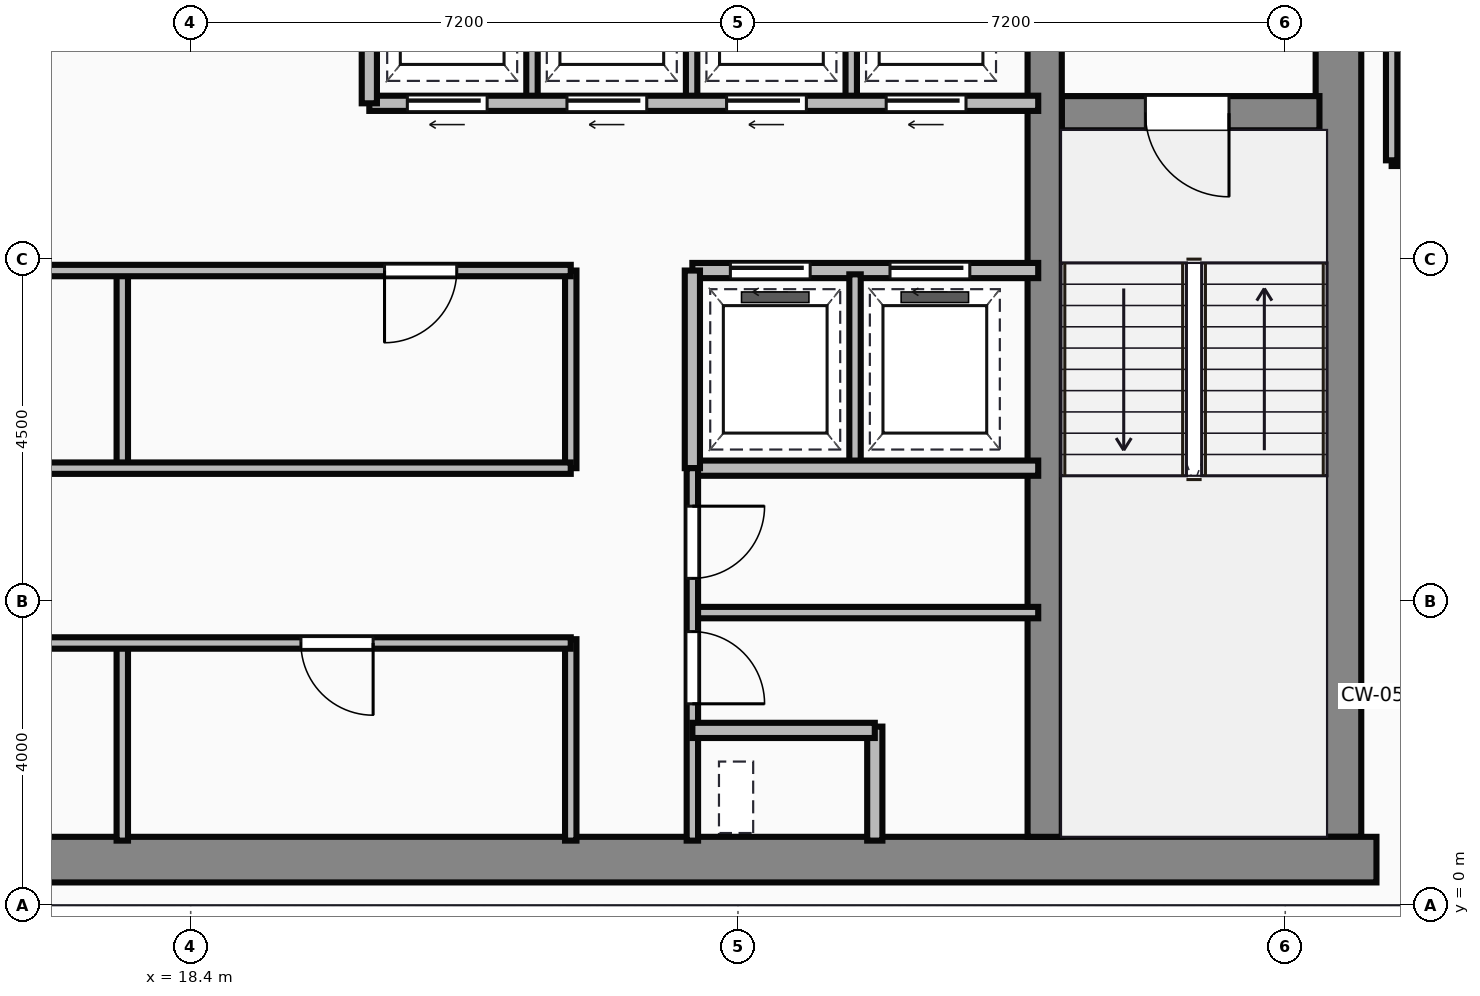
"""IFC4 building model, lengths in metres.
Left out: names, types, materials, properties, quantities, classifications, styles, units other than length and angle.
Written with IfcOpenShell. Run it as: python <this file> out.ifc"""

import sys

from ifc_helpers import new_model, si_unit, direction, frame, frame_2d, origin, place, context, subcontext, project, spatial, rectangle, extrude, source, transform, mapped, element, fill, save


model = new_model("IFC4")
c1 = context("Model", 3, precision=1e-05, world=origin(), true_north=direction((0.0, 1.0)))
c2 = subcontext(c1, "Body", "Model", "MODEL_VIEW")
j1 = project(units=[si_unit("LENGTHUNIT", "METRE"), si_unit("PLANEANGLEUNIT", "RADIAN")], contexts=[c1])
p1 = place(None, origin())
s1 = spatial("IfcSite", under=j1, at=p1, CompositionType="ELEMENT")
p2 = place(p1, origin())
s2 = spatial("IfcBuilding", under=s1, at=p2, CompositionType="ELEMENT")
p3 = place(p2, frame((0.0, 0.0, 217.8)))
s3 = spatial("IfcBuildingStorey", under=s2, at=p3, CompositionType="ELEMENT", Elevation=217.8)
m1 = source(origin(), c2, "Body", "SweptSolid", [
    extrude(rectangle(XDim=29.5, YDim=0.6, at=frame_2d((14.75, 0.0))), origin(), (0.0, 0.0, 1.0), 3.65),
])
p4 = place(p3, frame((4.5, 0.6, 0.0), z_axis=(0.0, 0.0, 1.0), x_axis=(1.0, 0.0, 0.0)))
e1 = element("IfcWall", 1, at=p4, inside=s3, PredefinedType="SHEAR", context=c2, shape_type="MappedRepresentation", body=[
    mapped(m1, transform((0.0, 0.0, 0.0))),
])
m2 = source(origin(), c2, "Body", "SweptSolid", [
    extrude(rectangle(XDim=13.1, YDim=0.6, at=frame_2d((6.55, 0.0))), origin(), (0.0, 0.0, 1.0), 3.65),
])
p5 = place(p3, frame((33.5, 0.9, 0.0), z_axis=(0.0, 0.0, 1.0), x_axis=(0.0, 1.0, 0.0)))
e2 = element("IfcWall", 2, at=p5, inside=s3, PredefinedType="SHEAR", context=c2, shape_type="MappedRepresentation", body=[
    mapped(m2, transform((0.0, 0.0, 0.0))),
])
m3 = source(origin(), c2, "Body", "SweptSolid", [
    extrude(rectangle(XDim=12.5, YDim=0.45, at=frame_2d((6.25, 0.0))), origin(), (0.0, 0.0, 1.0), 3.65),
])
p6 = place(p3, frame((29.635, 0.9, 0.0), z_axis=(0.0, 0.0, 1.0), x_axis=(0.0, 1.0, 0.0)))
e3 = element("IfcWall", 3, at=p6, inside=s3, PredefinedType="SHEAR", context=c2, shape_type="MappedRepresentation", body=[
    mapped(m3, transform((0.0, 0.0, 0.0))),
])
m4 = source(origin(), c2, "Body", "SweptSolid", [
    extrude(rectangle(XDim=3.39, YDim=0.45, at=frame_2d((1.695, 0.0))), origin(), (0.0, 0.0, 1.0), 3.65),
])
p7 = place(p3, frame((29.86, 10.42, 0.0), z_axis=(0.0, 0.0, 1.0), x_axis=(1.0, 0.0, 0.0)))
e4 = element("IfcWall", 4, at=p7, inside=s3, PredefinedType="SHEAR", context=c2, shape_type="MappedRepresentation", body=[
    mapped(m4, transform((0.0, 0.0, 0.0))),
])
p8 = place(p7, frame((1.1, 0.0, 0.0)))
e5 = element("IfcOpeningElement", 5, at=p8, cuts=e4, PredefinedType="OPENING", context=c2, shape_type="SweptSolid", body=[
    extrude(rectangle(XDim=1.1, YDim=2.15, at=frame_2d((0.55, 1.075))), frame((0.0, 0.235, 0.0), z_axis=(0.0, -1.0, 0.0), x_axis=(1.0, 0.0, 0.0)), (0.0, 0.0, 1.0), 0.47),
])
m5 = source(origin(), c2, "Body", "SweptSolid", [
    extrude(rectangle(XDim=10.35, YDim=0.15, at=frame_2d((5.175, 0.0))), origin(), (0.0, 0.0, 1.0), 3.4),
])
p9 = place(p3, frame((13.05, 3.45, 0.0), z_axis=(0.0, 0.0, 1.0), x_axis=(1.0, 0.0, 0.0)))
e6 = element("IfcWall", 6, at=p9, inside=s3, PredefinedType="PARTITIONING", context=c2, shape_type="MappedRepresentation", body=[
    mapped(m5, transform((0.0, 0.0, 0.0))),
])
p10 = place(p9, frame((2.1, 0.0, 0.0)))
e7 = element("IfcOpeningElement", 7, at=p10, cuts=e6, PredefinedType="OPENING", context=c2, shape_type="SweptSolid", body=[
    extrude(rectangle(XDim=0.95, YDim=2.15, at=frame_2d((0.475, 1.075))), frame((0.0, 0.085, 0.0), z_axis=(0.0, -1.0, 0.0), x_axis=(1.0, 0.0, 0.0)), (0.0, 0.0, 1.0), 0.17),
])
p11 = place(p9, frame((6.8, 0.0, 0.0)))
e8 = element("IfcOpeningElement", 8, at=p11, cuts=e6, PredefinedType="OPENING", context=c2, shape_type="SweptSolid", body=[
    extrude(rectangle(XDim=0.95, YDim=2.15, at=frame_2d((0.475, 1.075))), frame((0.0, 0.085, 0.0), z_axis=(0.0, -1.0, 0.0), x_axis=(1.0, 0.0, 0.0)), (0.0, 0.0, 1.0), 0.17),
])
m6 = source(origin(), c2, "Body", "SweptSolid", [
    extrude(rectangle(XDim=2.65, YDim=0.15, at=frame_2d((1.325, 0.0))), origin(), (0.0, 0.0, 1.0), 3.4),
])
p12 = place(p3, frame((23.4, 0.85, 0.0), z_axis=(0.0, 0.0, 1.0), x_axis=(0.0, 1.0, 0.0)))
e9 = element("IfcWall", 9, at=p12, inside=s3, PredefinedType="PARTITIONING", context=c2, shape_type="MappedRepresentation", body=[
    mapped(m6, transform((0.0, 0.0, 0.0))),
])
m7 = source(origin(), c2, "Body", "SweptSolid", [
    extrude(rectangle(XDim=2.6, YDim=0.15, at=frame_2d((1.3, 0.0))), origin(), (0.0, 0.0, 1.0), 3.4),
])
p13 = place(p3, frame((17.5, 0.85, 0.0), z_axis=(0.0, 0.0, 1.0), x_axis=(0.0, 1.0, 0.0)))
e10 = element("IfcWall", 10, at=p13, inside=s3, PredefinedType="PARTITIONING", context=c2, shape_type="MappedRepresentation", body=[
    mapped(m7, transform((0.0, 0.0, 0.0))),
])
m8 = source(origin(), c2, "Body", "SweptSolid", [
    extrude(rectangle(XDim=11.85, YDim=0.15, at=frame_2d((5.925, 0.0))), origin(), (0.0, 0.0, 1.0), 3.4),
])
p14 = place(p3, frame((11.55, 5.75, 0.0), z_axis=(0.0, 0.0, 1.0), x_axis=(1.0, 0.0, 0.0)))
e11 = element("IfcWall", 11, at=p14, inside=s3, PredefinedType="PARTITIONING", context=c2, shape_type="MappedRepresentation", body=[
    mapped(m8, transform((0.0, 0.0, 0.0))),
])
p15 = place(p3, frame((11.55, 8.35, 0.0), z_axis=(0.0, 0.0, 1.0), x_axis=(1.0, 0.0, 0.0)))
e12 = element("IfcWall", 12, at=p15, inside=s3, PredefinedType="PARTITIONING", context=c2, shape_type="MappedRepresentation", body=[
    mapped(m8, transform((0.0, 0.0, 0.0))),
])
p16 = place(p15, frame((1.1, 0.0, 0.0)))
e13 = element("IfcOpeningElement", 13, at=p16, cuts=e12, PredefinedType="OPENING", context=c2, shape_type="SweptSolid", body=[
    extrude(rectangle(XDim=0.95, YDim=2.15, at=frame_2d((0.475, 1.075))), frame((0.0, 0.085, 0.0), z_axis=(0.0, -1.0, 0.0), x_axis=(1.0, 0.0, 0.0)), (0.0, 0.0, 1.0), 0.17),
])
p17 = place(p15, frame((9.4, 0.0, 0.0)))
e14 = element("IfcOpeningElement", 14, at=p17, cuts=e12, PredefinedType="OPENING", context=c2, shape_type="SweptSolid", body=[
    extrude(rectangle(XDim=0.95, YDim=2.15, at=frame_2d((0.475, 1.075))), frame((0.0, 0.085, 0.0), z_axis=(0.0, -1.0, 0.0), x_axis=(1.0, 0.0, 0.0)), (0.0, 0.0, 1.0), 0.17),
])
m9 = source(origin(), c2, "Body", "SweptSolid", [
    extrude(rectangle(XDim=2.6, YDim=0.15, at=frame_2d((1.3, 0.0))), origin(), (0.0, 0.0, 1.0), 3.4),
])
p18 = place(p3, frame((23.4, 5.75, 0.0), z_axis=(0.0, 0.0, 1.0), x_axis=(0.0, 1.0, 0.0)))
e15 = element("IfcWall", 15, at=p18, inside=s3, PredefinedType="PARTITIONING", context=c2, shape_type="MappedRepresentation", body=[
    mapped(m9, transform((0.0, 0.0, 0.0))),
])
m10 = source(origin(), c2, "Body", "SweptSolid", [
    extrude(rectangle(XDim=2.5, YDim=0.15, at=frame_2d((1.25, 0.0))), origin(), (0.0, 0.0, 1.0), 3.4),
])
p19 = place(p3, frame((17.5, 5.8, 0.0), z_axis=(0.0, 0.0, 1.0), x_axis=(0.0, 1.0, 0.0)))
e16 = element("IfcWall", 16, at=p19, inside=s3, PredefinedType="PARTITIONING", context=c2, shape_type="MappedRepresentation", body=[
    mapped(m10, transform((0.0, 0.0, 0.0))),
])
m11 = source(origin(), c2, "Body", "SweptSolid", [
    extrude(rectangle(XDim=8.8, YDim=0.2, at=frame_2d((4.4, 0.0))), origin(), (0.0, 0.0, 1.0), 3.4),
])
p20 = place(p3, frame((20.75, 10.55, 0.0), z_axis=(0.0, 0.0, 1.0), x_axis=(1.0, 0.0, 0.0)))
e17 = element("IfcWall", 17, at=p20, inside=s3, PredefinedType="PARTITIONING", context=c2, shape_type="MappedRepresentation", body=[
    mapped(m11, transform((0.0, 0.0, 0.0))),
])
p21 = place(p20, frame((0.5, 0.0, 0.0)))
e18 = element("IfcOpeningElement", 18, at=p21, cuts=e17, PredefinedType="OPENING", context=c2, shape_type="SweptSolid", body=[
    extrude(rectangle(XDim=1.05, YDim=2.15, at=frame_2d((0.525, 1.075))), frame((0.0, 0.11, 0.0), z_axis=(0.0, -1.0, 0.0), x_axis=(1.0, 0.0, 0.0)), (0.0, 0.0, 1.0), 0.22),
])
p22 = place(p20, frame((2.6, 0.0, 0.0)))
e19 = element("IfcOpeningElement", 19, at=p22, cuts=e17, PredefinedType="OPENING", context=c2, shape_type="SweptSolid", body=[
    extrude(rectangle(XDim=1.05, YDim=2.15, at=frame_2d((0.525, 1.075))), frame((0.0, 0.11, 0.0), z_axis=(0.0, -1.0, 0.0), x_axis=(1.0, 0.0, 0.0)), (0.0, 0.0, 1.0), 0.22),
])
p23 = place(p20, frame((4.7, 0.0, 0.0)))
e20 = element("IfcOpeningElement", 20, at=p23, cuts=e17, PredefinedType="OPENING", context=c2, shape_type="SweptSolid", body=[
    extrude(rectangle(XDim=1.05, YDim=2.15, at=frame_2d((0.525, 1.075))), frame((0.0, 0.11, 0.0), z_axis=(0.0, -1.0, 0.0), x_axis=(1.0, 0.0, 0.0)), (0.0, 0.0, 1.0), 0.22),
])
p24 = place(p20, frame((6.8, 0.0, 0.0)))
e21 = element("IfcOpeningElement", 21, at=p24, cuts=e17, PredefinedType="OPENING", context=c2, shape_type="SweptSolid", body=[
    extrude(rectangle(XDim=1.05, YDim=2.15, at=frame_2d((0.525, 1.075))), frame((0.0, 0.11, 0.0), z_axis=(0.0, -1.0, 0.0), x_axis=(1.0, 0.0, 0.0)), (0.0, 0.0, 1.0), 0.22),
])
m12 = source(origin(), c2, "Body", "SweptSolid", [
    extrude(rectangle(XDim=3.0, YDim=0.2, at=frame_2d((1.5, 0.0))), origin(), (0.0, 0.0, 1.0), 3.4),
])
p25 = place(p3, frame((20.75, 10.55, 0.0), z_axis=(0.0, 0.0, 1.0), x_axis=(0.0, 1.0, 0.0)))
e22 = element("IfcWall", 22, at=p25, inside=s3, PredefinedType="PARTITIONING", context=c2, shape_type="MappedRepresentation", body=[
    mapped(m12, transform((0.0, 0.0, 0.0))),
])
m13 = source(origin(), c2, "Body", "SweptSolid", [
    extrude(rectangle(XDim=2.85, YDim=0.15, at=frame_2d((1.425, 0.0))), origin(), (0.0, 0.0, 1.0), 3.4),
])
for number, where, z_axis, x_axis in (
    (23, (22.89, 10.6, 0.0), (0.0, 0.0, 1.0), (0.0, 1.0, 0.0)),
    (24, (24.99, 10.6, 0.0), (0.0, 0.0, 1.0), (0.0, 1.0, 0.0)),
    (25, (27.09, 10.6, 0.0), (0.0, 0.0, 1.0), (0.0, 1.0, 0.0)),
):
    element("IfcWall", number, at=place(p3, frame(where, z_axis=z_axis, x_axis=x_axis)), inside=s3, PredefinedType="PARTITIONING", context=c2, shape_type="MappedRepresentation", body=[
        mapped(m13, transform((0.0, 0.0, 0.0))),
    ])
m14 = source(origin(), c2, "Body", "SweptSolid", [
    extrude(rectangle(XDim=4.55, YDim=0.2, at=frame_2d((2.275, 0.0))), origin(), (0.0, 0.0, 1.0), 3.4),
])
p26 = place(p3, frame((25.0, 8.35, 0.0), z_axis=(0.0, 0.0, 1.0), x_axis=(1.0, 0.0, 0.0)))
e26 = element("IfcWall", 26, at=p26, inside=s3, PredefinedType="PARTITIONING", context=c2, shape_type="MappedRepresentation", body=[
    mapped(m14, transform((0.0, 0.0, 0.0))),
])
p27 = place(p26, frame((0.5, 0.0, 0.0)))
e27 = element("IfcOpeningElement", 27, at=p27, cuts=e26, PredefinedType="OPENING", context=c2, shape_type="SweptSolid", body=[
    extrude(rectangle(XDim=1.05, YDim=2.15, at=frame_2d((0.525, 1.075))), frame((0.0, 0.11, 0.0), z_axis=(0.0, -1.0, 0.0), x_axis=(1.0, 0.0, 0.0)), (0.0, 0.0, 1.0), 0.22),
])
p28 = place(p26, frame((2.6, 0.0, 0.0)))
e28 = element("IfcOpeningElement", 28, at=p28, cuts=e26, PredefinedType="OPENING", context=c2, shape_type="SweptSolid", body=[
    extrude(rectangle(XDim=1.05, YDim=2.15, at=frame_2d((0.525, 1.075))), frame((0.0, 0.11, 0.0), z_axis=(0.0, -1.0, 0.0), x_axis=(1.0, 0.0, 0.0)), (0.0, 0.0, 1.0), 0.22),
])
p29 = place(p3, frame((25.0, 5.75, 0.0), z_axis=(0.0, 0.0, 1.0), x_axis=(1.0, 0.0, 0.0)))
e29 = element("IfcWall", 29, at=p29, inside=s3, PredefinedType="PARTITIONING", context=c2, shape_type="MappedRepresentation", body=[
    mapped(m14, transform((0.0, 0.0, 0.0))),
])
m15 = source(origin(), c2, "Body", "SweptSolid", [
    extrude(rectangle(XDim=2.6, YDim=0.2, at=frame_2d((1.3, 0.0))), origin(), (0.0, 0.0, 1.0), 3.4),
])
p30 = place(p3, frame((25.0, 5.75, 0.0), z_axis=(0.0, 0.0, 1.0), x_axis=(0.0, 1.0, 0.0)))
e30 = element("IfcWall", 30, at=p30, inside=s3, PredefinedType="PARTITIONING", context=c2, shape_type="MappedRepresentation", body=[
    mapped(m15, transform((0.0, 0.0, 0.0))),
])
p31 = place(p3, frame((27.14, 5.8, 0.0), z_axis=(0.0, 0.0, 1.0), x_axis=(0.0, 1.0, 0.0)))
e31 = element("IfcWall", 31, at=p31, inside=s3, PredefinedType="PARTITIONING", context=c2, shape_type="MappedRepresentation", body=[
    mapped(m10, transform((0.0, 0.0, 0.0))),
])
m16 = source(origin(), c2, "Body", "SweptSolid", [
    extrude(rectangle(XDim=4.9, YDim=0.15, at=frame_2d((2.45, 0.0))), origin(), (0.0, 0.0, 1.0), 3.4),
])
p32 = place(p3, frame((25.0, 0.85, 0.0), z_axis=(0.0, 0.0, 1.0), x_axis=(0.0, 1.0, 0.0)))
e32 = element("IfcWall", 32, at=p32, inside=s3, PredefinedType="PARTITIONING", context=c2, shape_type="MappedRepresentation", body=[
    mapped(m16, transform((0.0, 0.0, 0.0))),
])
p33 = place(p32, frame((1.8, 0.0, 0.0)))
e33 = element("IfcOpeningElement", 33, at=p33, cuts=e32, PredefinedType="OPENING", context=c2, shape_type="SweptSolid", body=[
    extrude(rectangle(XDim=0.95, YDim=2.15, at=frame_2d((0.475, 1.075))), frame((0.0, 0.085, 0.0), z_axis=(0.0, -1.0, 0.0), x_axis=(1.0, 0.0, 0.0)), (0.0, 0.0, 1.0), 0.17),
])
p34 = place(p32, frame((3.45, 0.0, 0.0)))
e34 = element("IfcOpeningElement", 34, at=p34, cuts=e32, PredefinedType="OPENING", context=c2, shape_type="SweptSolid", body=[
    extrude(rectangle(XDim=0.95, YDim=2.15, at=frame_2d((0.475, 1.075))), frame((0.0, 0.085, 0.0), z_axis=(0.0, -1.0, 0.0), x_axis=(1.0, 0.0, 0.0)), (0.0, 0.0, 1.0), 0.17),
])
m17 = source(origin(), c2, "Body", "SweptSolid", [
    extrude(rectangle(XDim=2.4, YDim=0.2, at=frame_2d((1.2, 0.0))), origin(), (0.0, 0.0, 1.0), 3.4),
])
p35 = place(p3, frame((25.0, 2.3, 0.0), z_axis=(0.0, 0.0, 1.0), x_axis=(1.0, 0.0, 0.0)))
e35 = element("IfcWall", 35, at=p35, inside=s3, PredefinedType="PARTITIONING", context=c2, shape_type="MappedRepresentation", body=[
    mapped(m17, transform((0.0, 0.0, 0.0))),
])
m18 = source(origin(), c2, "Body", "SweptSolid", [
    extrude(rectangle(XDim=1.5, YDim=0.2, at=frame_2d((0.75, 0.0))), origin(), (0.0, 0.0, 1.0), 3.4),
])
p36 = place(p3, frame((27.4, 0.85, 0.0), z_axis=(0.0, 0.0, 1.0), x_axis=(0.0, 1.0, 0.0)))
e36 = element("IfcWall", 36, at=p36, inside=s3, PredefinedType="PARTITIONING", context=c2, shape_type="MappedRepresentation", body=[
    mapped(m18, transform((0.0, 0.0, 0.0))),
])
m19 = source(origin(), c2, "Body", "SweptSolid", [
    extrude(rectangle(XDim=4.55, YDim=0.15, at=frame_2d((2.275, 0.0))), origin(), (0.0, 0.0, 1.0), 3.4),
])
p37 = place(p3, frame((25.0, 3.85, 0.0), z_axis=(0.0, 0.0, 1.0), x_axis=(1.0, 0.0, 0.0)))
e37 = element("IfcWall", 37, at=p37, inside=s3, PredefinedType="PARTITIONING", context=c2, shape_type="MappedRepresentation", body=[
    mapped(m19, transform((0.0, 0.0, 0.0))),
])
m20 = source(origin(), c2, "Body", "SweptSolid", [
    extrude(rectangle(XDim=4.8, YDim=0.15, at=frame_2d((2.4, 0.0))), origin(), (0.0, 0.0, 1.0), 3.4),
])
p38 = place(p3, frame((34.2, 9.8, 0.0), z_axis=(0.0, 0.0, 1.0), x_axis=(1.0, 0.0, 0.0)))
e38 = element("IfcWall", 38, at=p38, inside=s3, PredefinedType="PARTITIONING", context=c2, shape_type="MappedRepresentation", body=[
    mapped(m20, transform((0.0, 0.0, 0.0))),
])
m21 = source(origin(), c2, "Body", "SweptSolid", [
    extrude(rectangle(XDim=4.18, YDim=0.15, at=frame_2d((2.09, 0.0))), origin(), (0.0, 0.0, 1.0), 3.4),
])
p39 = place(p3, frame((34.2, 9.8, 0.0), z_axis=(0.0, 0.0, 1.0), x_axis=(0.0, 1.0, 0.0)))
e39 = element("IfcWall", 39, at=p39, inside=s3, PredefinedType="PARTITIONING", context=c2, shape_type="MappedRepresentation", body=[
    mapped(m21, transform((0.0, 0.0, 0.0))),
])
m22 = source(origin(), c2, "Body", "SweptSolid", [
    extrude(rectangle(XDim=1.1, YDim=2.15, at=frame_2d((0.55, 1.075))), frame((0.0, 0.025, 0.0), z_axis=(0.0, -1.0, 0.0), x_axis=(1.0, 0.0, 0.0)), (0.0, 0.0, 1.0), 0.05),
])
p40 = place(p8, frame((1.1, 0.0, 0.0), z_axis=(0.0, 0.0, 1.0), x_axis=(-1.0, 0.0, 0.0)))
e40 = element("IfcDoor", 40, at=p40, inside=s3, OperationType="SINGLE_SWING_RIGHT", PredefinedType="DOOR", context=c2, shape_type="MappedRepresentation", body=[
    mapped(m22, transform((0.0, 0.0, 0.0))),
])
fill(e5, e40)
m23 = source(origin(), c2, "Body", "SweptSolid", [
    extrude(rectangle(XDim=0.95, YDim=2.15, at=frame_2d((0.475, 1.075))), frame((0.0, 0.025, 0.0), z_axis=(0.0, -1.0, 0.0), x_axis=(1.0, 0.0, 0.0)), (0.0, 0.0, 1.0), 0.05),
])
p41 = place(p11, origin())
e41 = element("IfcDoor", 41, at=p41, inside=s3, OperationType="SINGLE_SWING_RIGHT", PredefinedType="DOOR", context=c2, shape_type="MappedRepresentation", body=[
    mapped(m23, transform((0.0, 0.0, 0.0))),
])
fill(e8, e41)
p42 = place(p17, origin())
e42 = element("IfcDoor", 42, at=p42, inside=s3, OperationType="SINGLE_SWING_LEFT", PredefinedType="DOOR", context=c2, shape_type="MappedRepresentation", body=[
    mapped(m23, transform((0.0, 0.0, 0.0))),
])
fill(e14, e42)
m24 = source(origin(), c2, "Body", "SweptSolid", [
    extrude(rectangle(XDim=1.05, YDim=2.15, at=frame_2d((0.525, 1.075))), frame((0.0, 0.025, 0.0), z_axis=(0.0, -1.0, 0.0), x_axis=(1.0, 0.0, 0.0)), (0.0, 0.0, 1.0), 0.05),
])
p43 = place(p21, frame((1.05, 0.0, 0.0), z_axis=(0.0, 0.0, 1.0), x_axis=(-1.0, 0.0, 0.0)))
e43 = element("IfcDoor", 43, at=p43, inside=s3, OperationType="SLIDING_TO_LEFT", PredefinedType="DOOR", context=c2, shape_type="MappedRepresentation", body=[
    mapped(m24, transform((0.0, 0.0, 0.0))),
])
fill(e18, e43)
p44 = place(p22, frame((1.05, 0.0, 0.0), z_axis=(0.0, 0.0, 1.0), x_axis=(-1.0, 0.0, 0.0)))
e44 = element("IfcDoor", 44, at=p44, inside=s3, OperationType="SLIDING_TO_LEFT", PredefinedType="DOOR", context=c2, shape_type="MappedRepresentation", body=[
    mapped(m24, transform((0.0, 0.0, 0.0))),
])
fill(e19, e44)
p45 = place(p23, frame((1.05, 0.0, 0.0), z_axis=(0.0, 0.0, 1.0), x_axis=(-1.0, 0.0, 0.0)))
e45 = element("IfcDoor", 45, at=p45, inside=s3, OperationType="SLIDING_TO_LEFT", PredefinedType="DOOR", context=c2, shape_type="MappedRepresentation", body=[
    mapped(m24, transform((0.0, 0.0, 0.0))),
])
fill(e20, e45)
p46 = place(p24, frame((1.05, 0.0, 0.0), z_axis=(0.0, 0.0, 1.0), x_axis=(-1.0, 0.0, 0.0)))
e46 = element("IfcDoor", 46, at=p46, inside=s3, OperationType="SLIDING_TO_LEFT", PredefinedType="DOOR", context=c2, shape_type="MappedRepresentation", body=[
    mapped(m24, transform((0.0, 0.0, 0.0))),
])
fill(e21, e46)
p47 = place(p27, origin())
e47 = element("IfcDoor", 47, at=p47, inside=s3, OperationType="SLIDING_TO_LEFT", PredefinedType="DOOR", context=c2, shape_type="MappedRepresentation", body=[
    mapped(m24, transform((0.0, 0.0, 0.0))),
])
fill(e27, e47)
p48 = place(p28, origin())
e48 = element("IfcDoor", 48, at=p48, inside=s3, OperationType="SLIDING_TO_LEFT", PredefinedType="DOOR", context=c2, shape_type="MappedRepresentation", body=[
    mapped(m24, transform((0.0, 0.0, 0.0))),
])
fill(e28, e48)
p49 = place(p33, origin())
e49 = element("IfcDoor", 49, at=p49, inside=s3, OperationType="SINGLE_SWING_LEFT", PredefinedType="DOOR", context=c2, shape_type="MappedRepresentation", body=[
    mapped(m23, transform((0.0, 0.0, 0.0))),
])
fill(e33, e49)
p50 = place(p34, origin())
e50 = element("IfcDoor", 50, at=p50, inside=s3, OperationType="SINGLE_SWING_RIGHT", PredefinedType="DOOR", context=c2, shape_type="MappedRepresentation", body=[
    mapped(m23, transform((0.0, 0.0, 0.0))),
])
fill(e34, e50)
save(model, sys.argv[1])
